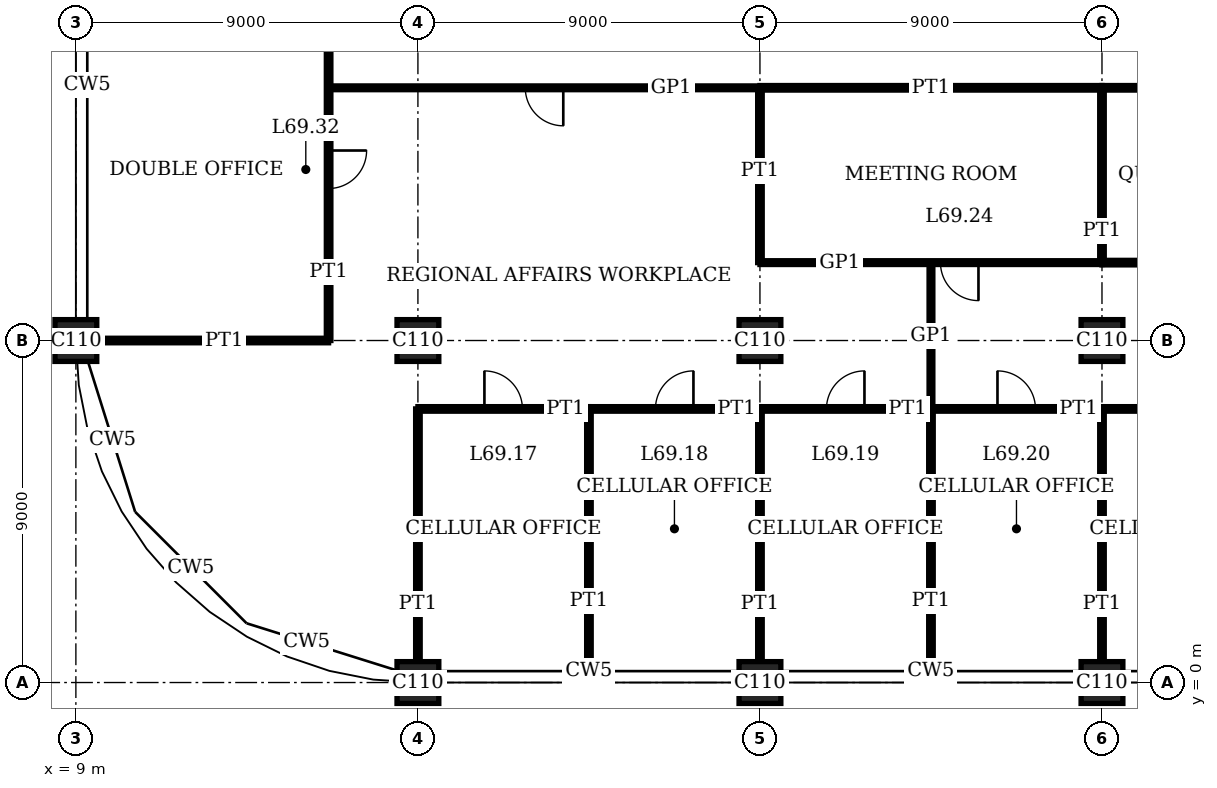
"""IFC4 building model, lengths in metres.
Left out: names, types, materials, properties, quantities, classifications, styles, units other than length and angle.
Written with IfcOpenShell. Run it as: python <this file> out.ifc"""

import sys

from ifc_helpers import new_model, si_unit, direction, frame, frame_2d, origin, origin_2d, place, context, subcontext, project, spatial, rectangle, extrude, element, fill, save


model = new_model("IFC4")
c1 = context("Model", 3, precision=1e-05, world=origin(), true_north=direction((0.0, 1.0)))
c2 = subcontext(c1, "Body", "Model", "MODEL_VIEW")
j1 = project(units=[si_unit("LENGTHUNIT", "METRE"), si_unit("PLANEANGLEUNIT", "RADIAN")], contexts=[c1])
p1 = place(None, origin())
s1 = spatial("IfcSite", under=j1, at=p1, CompositionType="ELEMENT")
p2 = place(p1, origin())
s2 = spatial("IfcBuilding", under=s1, at=p2, CompositionType="ELEMENT")
p3 = place(p2, frame((0.0, 0.0, 283.4)))
s3 = spatial("IfcBuildingStorey", under=s2, at=p3, CompositionType="ELEMENT", Elevation=283.4)
for number, where, z_axis, x_axis in (
    (1, (9.0, 9.0, 0.0), (0.0, 0.0, 1.0), (1.0, 0.0, 0.0)),
    (2, (18.0, 0.0, 0.0), (0.0, 0.0, 1.0), (1.0, 0.0, 0.0)),
    (3, (18.0, 9.0, 0.0), (0.0, 0.0, 1.0), (1.0, 0.0, 0.0)),
    (4, (27.0, 0.0, 0.0), (0.0, 0.0, 1.0), (1.0, 0.0, 0.0)),
    (5, (27.0, 9.0, 0.0), (0.0, 0.0, 1.0), (1.0, 0.0, 0.0)),
    (6, (36.0, 0.0, 0.0), (0.0, 0.0, 1.0), (1.0, 0.0, 0.0)),
    (7, (36.0, 9.0, 0.0), (0.0, 0.0, 1.0), (1.0, 0.0, 0.0)),
):
    element("IfcColumn", number, at=place(p3, frame(where, z_axis=z_axis, x_axis=x_axis)), inside=s3, PredefinedType="COLUMN", context=c2, shape_type="SweptSolid", body=[
        extrude(rectangle(XDim=1.1, YDim=1.1, at=origin_2d()), origin(), (0.0, 0.0, 1.0), 4.0),
    ])
p4 = place(p3, frame((18.0, 7.2, 0.0), z_axis=(0.0, 0.0, 1.0), x_axis=(1.0, 0.0, 0.0)))
e8 = element("IfcWall", 8, at=p4, inside=s3, PredefinedType="PARTITIONING", context=c2, shape_type="SweptSolid", body=[
    extrude(rectangle(XDim=4.5, YDim=0.12, at=frame_2d((2.25, 0.0))), origin(), (0.0, 0.0, 1.0), 3.75),
])
p5 = place(p4, frame((1.75, 0.0, 0.0)))
e9 = element("IfcOpeningElement", 9, at=p5, cuts=e8, PredefinedType="OPENING", context=c2, shape_type="SweptSolid", body=[
    extrude(rectangle(XDim=1.0, YDim=2.4, at=frame_2d((0.5, 1.2))), frame((0.0, 0.07, 0.0), z_axis=(0.0, -1.0, 0.0), x_axis=(1.0, 0.0, 0.0)), (0.0, 0.0, 1.0), 0.14),
])
p6 = place(p3, frame((22.5, 7.2, 0.0), z_axis=(0.0, 0.0, 1.0), x_axis=(1.0, 0.0, 0.0)))
e10 = element("IfcWall", 10, at=p6, inside=s3, PredefinedType="PARTITIONING", context=c2, shape_type="SweptSolid", body=[
    extrude(rectangle(XDim=4.5, YDim=0.12, at=frame_2d((2.25, 0.0))), origin(), (0.0, 0.0, 1.0), 3.75),
])
p7 = place(p6, frame((1.75, 0.0, 0.0)))
e11 = element("IfcOpeningElement", 11, at=p7, cuts=e10, PredefinedType="OPENING", context=c2, shape_type="SweptSolid", body=[
    extrude(rectangle(XDim=1.0, YDim=2.4, at=frame_2d((0.5, 1.2))), frame((0.0, 0.07, 0.0), z_axis=(0.0, -1.0, 0.0), x_axis=(1.0, 0.0, 0.0)), (0.0, 0.0, 1.0), 0.14),
])
p8 = place(p3, frame((27.0, 7.2, 0.0), z_axis=(0.0, 0.0, 1.0), x_axis=(1.0, 0.0, 0.0)))
e12 = element("IfcWall", 12, at=p8, inside=s3, PredefinedType="PARTITIONING", context=c2, shape_type="SweptSolid", body=[
    extrude(rectangle(XDim=4.5, YDim=0.12, at=frame_2d((2.25, 0.0))), origin(), (0.0, 0.0, 1.0), 3.75),
])
p9 = place(p8, frame((1.75, 0.0, 0.0)))
e13 = element("IfcOpeningElement", 13, at=p9, cuts=e12, PredefinedType="OPENING", context=c2, shape_type="SweptSolid", body=[
    extrude(rectangle(XDim=1.0, YDim=2.4, at=frame_2d((0.5, 1.2))), frame((0.0, 0.07, 0.0), z_axis=(0.0, -1.0, 0.0), x_axis=(1.0, 0.0, 0.0)), (0.0, 0.0, 1.0), 0.14),
])
p10 = place(p3, frame((31.5, 7.2, 0.0), z_axis=(0.0, 0.0, 1.0), x_axis=(1.0, 0.0, 0.0)))
e14 = element("IfcWall", 14, at=p10, inside=s3, PredefinedType="PARTITIONING", context=c2, shape_type="SweptSolid", body=[
    extrude(rectangle(XDim=4.5, YDim=0.12, at=frame_2d((2.25, 0.0))), origin(), (0.0, 0.0, 1.0), 3.75),
])
p11 = place(p10, frame((1.75, 0.0, 0.0)))
e15 = element("IfcOpeningElement", 15, at=p11, cuts=e14, PredefinedType="OPENING", context=c2, shape_type="SweptSolid", body=[
    extrude(rectangle(XDim=1.0, YDim=2.4, at=frame_2d((0.5, 1.2))), frame((0.0, 0.07, 0.0), z_axis=(0.0, -1.0, 0.0), x_axis=(1.0, 0.0, 0.0)), (0.0, 0.0, 1.0), 0.14),
])
p12 = place(p3, frame((36.0, 7.2, 0.0), z_axis=(0.0, 0.0, 1.0), x_axis=(1.0, 0.0, 0.0)))
e16 = element("IfcWall", 16, at=p12, inside=s3, PredefinedType="PARTITIONING", context=c2, shape_type="SweptSolid", body=[
    extrude(rectangle(XDim=4.5, YDim=0.12, at=frame_2d((2.25, 0.0))), origin(), (0.0, 0.0, 1.0), 3.75),
])
p13 = place(p12, frame((1.75, 0.0, 0.0)))
e17 = element("IfcOpeningElement", 17, at=p13, cuts=e16, PredefinedType="OPENING", context=c2, shape_type="SweptSolid", body=[
    extrude(rectangle(XDim=1.0, YDim=2.4, at=frame_2d((0.5, 1.2))), frame((0.0, 0.07, 0.0), z_axis=(0.0, -1.0, 0.0), x_axis=(1.0, 0.0, 0.0)), (0.0, 0.0, 1.0), 0.14),
])
p14 = place(p3, frame((9.55, 9.0, 0.0), z_axis=(0.0, 0.0, 1.0), x_axis=(1.0, 0.0, 0.0)))
e18 = element("IfcWall", 18, at=p14, inside=s3, PredefinedType="PARTITIONING", context=c2, shape_type="SweptSolid", body=[
    extrude(rectangle(XDim=6.1, YDim=0.12, at=frame_2d((3.05, 0.0))), origin(), (0.0, 0.0, 1.0), 3.05),
])
p15 = place(p3, frame((36.0, 11.05, 0.0), z_axis=(0.0, 0.0, 1.0), x_axis=(1.0, 0.0, 0.0)))
e19 = element("IfcWall", 19, at=p15, inside=s3, PredefinedType="PARTITIONING", context=c2, shape_type="SweptSolid", body=[
    extrude(rectangle(XDim=4.5, YDim=0.12, at=frame_2d((2.25, 0.0))), origin(), (0.0, 0.0, 1.0), 3.75),
])
p16 = place(p15, frame((1.75, 0.0, 0.0)))
e20 = element("IfcOpeningElement", 20, at=p16, cuts=e19, PredefinedType="OPENING", context=c2, shape_type="SweptSolid", body=[
    extrude(rectangle(XDim=1.0, YDim=2.4, at=frame_2d((0.5, 1.2))), frame((0.0, 0.07, 0.0), z_axis=(0.0, -1.0, 0.0), x_axis=(1.0, 0.0, 0.0)), (0.0, 0.0, 1.0), 0.14),
])
p17 = place(p3, frame((27.0, 11.05, 0.0), z_axis=(0.0, 0.0, 1.0), x_axis=(1.0, 0.0, 0.0)))
e21 = element("IfcWall", 21, at=p17, inside=s3, PredefinedType="PARTITIONING", context=c2, shape_type="SweptSolid", body=[
    extrude(rectangle(XDim=9.0, YDim=0.1, at=frame_2d((4.5, 0.0))), origin(), (0.0, 0.0, 1.0), 3.75),
])
p18 = place(p17, frame((4.75, 0.0, 0.0)))
e22 = element("IfcOpeningElement", 22, at=p18, cuts=e21, PredefinedType="OPENING", context=c2, shape_type="SweptSolid", body=[
    extrude(rectangle(XDim=1.0, YDim=2.4, at=frame_2d((0.5, 1.2))), frame((0.0, 0.06, 0.0), z_axis=(0.0, -1.0, 0.0), x_axis=(1.0, 0.0, 0.0)), (0.0, 0.0, 1.0), 0.12),
])
p19 = place(p3, frame((27.0, 15.65, 0.0), z_axis=(0.0, 0.0, 1.0), x_axis=(1.0, 0.0, 0.0)))
e23 = element("IfcWall", 23, at=p19, inside=s3, PredefinedType="PARTITIONING", context=c2, shape_type="SweptSolid", body=[
    extrude(rectangle(XDim=9.0, YDim=0.12, at=frame_2d((4.5, 0.0))), origin(), (0.0, 0.0, 1.0), 3.75),
])
p20 = place(p3, frame((36.0, 15.65, 0.0), z_axis=(0.0, 0.0, 1.0), x_axis=(1.0, 0.0, 0.0)))
e24 = element("IfcWall", 24, at=p20, inside=s3, PredefinedType="PARTITIONING", context=c2, shape_type="SweptSolid", body=[
    extrude(rectangle(XDim=4.5, YDim=0.12, at=frame_2d((2.25, 0.0))), origin(), (0.0, 0.0, 1.0), 3.75),
])
p21 = place(p3, frame((15.66, 15.65, 0.0), z_axis=(0.0, 0.0, 1.0), x_axis=(1.0, 0.0, 0.0)))
e25 = element("IfcWall", 25, at=p21, inside=s3, PredefinedType="PARTITIONING", context=c2, shape_type="SweptSolid", body=[
    extrude(rectangle(XDim=11.33, YDim=0.1, at=frame_2d((5.665, 0.0))), origin(), (0.0, 0.0, 1.0), 3.75),
])
p22 = place(p21, frame((5.165, 0.0, 0.0)))
e26 = element("IfcOpeningElement", 26, at=p22, cuts=e25, PredefinedType="OPENING", context=c2, shape_type="SweptSolid", body=[
    extrude(rectangle(XDim=1.0, YDim=2.4, at=frame_2d((0.5, 1.2))), frame((0.0, 0.06, 0.0), z_axis=(0.0, -1.0, 0.0), x_axis=(1.0, 0.0, 0.0)), (0.0, 0.0, 1.0), 0.12),
])
p23 = place(p3, frame((15.65, 9.0, 0.0), z_axis=(0.0, 0.0, 1.0), x_axis=(0.0, 1.0, 0.0)))
e27 = element("IfcWall", 27, at=p23, inside=s3, PredefinedType="PARTITIONING", context=c2, shape_type="SweptSolid", body=[
    extrude(rectangle(XDim=9.0, YDim=0.12, at=frame_2d((4.5, 0.0))), origin(), (0.0, 0.0, 1.0), 3.75),
])
p24 = place(p23, frame((4.0, 0.0, 0.0)))
e28 = element("IfcOpeningElement", 28, at=p24, cuts=e27, PredefinedType="OPENING", context=c2, shape_type="SweptSolid", body=[
    extrude(rectangle(XDim=1.0, YDim=2.4, at=frame_2d((0.5, 1.2))), frame((0.0, 0.07, 0.0), z_axis=(0.0, -1.0, 0.0), x_axis=(1.0, 0.0, 0.0)), (0.0, 0.0, 1.0), 0.14),
])
p25 = place(p3, frame((18.0, 0.55, 0.0), z_axis=(0.0, 0.0, 1.0), x_axis=(0.0, 1.0, 0.0)))
e29 = element("IfcWall", 29, at=p25, inside=s3, PredefinedType="PARTITIONING", context=c2, shape_type="SweptSolid", body=[
    extrude(rectangle(XDim=6.65, YDim=0.12, at=frame_2d((3.325, 0.0))), origin(), (0.0, 0.0, 1.0), 3.05),
])
p26 = place(p3, frame((22.5, 0.31, 0.0), z_axis=(0.0, 0.0, 1.0), x_axis=(0.0, 1.0, 0.0)))
e30 = element("IfcWall", 30, at=p26, inside=s3, PredefinedType="PARTITIONING", context=c2, shape_type="SweptSolid", body=[
    extrude(rectangle(XDim=6.89, YDim=0.12, at=frame_2d((3.445, 0.0))), origin(), (0.0, 0.0, 1.0), 3.75),
])
p27 = place(p3, frame((27.0, 0.55, 0.0), z_axis=(0.0, 0.0, 1.0), x_axis=(0.0, 1.0, 0.0)))
e31 = element("IfcWall", 31, at=p27, inside=s3, PredefinedType="PARTITIONING", context=c2, shape_type="SweptSolid", body=[
    extrude(rectangle(XDim=6.65, YDim=0.12, at=frame_2d((3.325, 0.0))), origin(), (0.0, 0.0, 1.0), 3.05),
])
p28 = place(p3, frame((27.0, 11.05, 0.0), z_axis=(0.0, 0.0, 1.0), x_axis=(0.0, 1.0, 0.0)))
e32 = element("IfcWall", 32, at=p28, inside=s3, PredefinedType="PARTITIONING", context=c2, shape_type="SweptSolid", body=[
    extrude(rectangle(XDim=4.6, YDim=0.12, at=frame_2d((2.3, 0.0))), origin(), (0.0, 0.0, 1.0), 3.05),
])
p29 = place(p3, frame((31.5, 0.31, 0.0), z_axis=(0.0, 0.0, 1.0), x_axis=(0.0, 1.0, 0.0)))
e33 = element("IfcWall", 33, at=p29, inside=s3, PredefinedType="PARTITIONING", context=c2, shape_type="SweptSolid", body=[
    extrude(rectangle(XDim=6.89, YDim=0.12, at=frame_2d((3.445, 0.0))), origin(), (0.0, 0.0, 1.0), 3.75),
])
p30 = place(p3, frame((31.5, 7.2, 0.0), z_axis=(0.0, 0.0, 1.0), x_axis=(0.0, 1.0, 0.0)))
e34 = element("IfcWall", 34, at=p30, inside=s3, PredefinedType="PARTITIONING", context=c2, shape_type="SweptSolid", body=[
    extrude(rectangle(XDim=3.86, YDim=0.1, at=frame_2d((1.93, 0.0))), origin(), (0.0, 0.0, 1.0), 3.75),
])
p31 = place(p3, frame((36.0, 0.55, 0.0), z_axis=(0.0, 0.0, 1.0), x_axis=(0.0, 1.0, 0.0)))
e35 = element("IfcWall", 35, at=p31, inside=s3, PredefinedType="PARTITIONING", context=c2, shape_type="SweptSolid", body=[
    extrude(rectangle(XDim=6.65, YDim=0.12, at=frame_2d((3.325, 0.0))), origin(), (0.0, 0.0, 1.0), 3.05),
])
p32 = place(p3, frame((36.0, 11.05, 0.0), z_axis=(0.0, 0.0, 1.0), x_axis=(0.0, 1.0, 0.0)))
e36 = element("IfcWall", 36, at=p32, inside=s3, PredefinedType="PARTITIONING", context=c2, shape_type="SweptSolid", body=[
    extrude(rectangle(XDim=4.6, YDim=0.12, at=frame_2d((2.3, 0.0))), origin(), (0.0, 0.0, 1.0), 3.05),
])
p33 = place(p5, origin())
e37 = element("IfcDoor", 37, at=p33, inside=s3, OperationType="SINGLE_SWING_RIGHT", PredefinedType="DOOR", context=c2, shape_type="SweptSolid", body=[
    extrude(rectangle(XDim=1.0, YDim=2.4, at=frame_2d((0.5, 1.2))), frame((0.0, 0.025, 0.0), z_axis=(0.0, -1.0, 0.0), x_axis=(1.0, 0.0, 0.0)), (0.0, 0.0, 1.0), 0.05),
])
fill(e9, e37)
p34 = place(p7, origin())
e38 = element("IfcDoor", 38, at=p34, inside=s3, OperationType="SINGLE_SWING_LEFT", PredefinedType="DOOR", context=c2, shape_type="SweptSolid", body=[
    extrude(rectangle(XDim=1.0, YDim=2.4, at=frame_2d((0.5, 1.2))), frame((0.0, 0.025, 0.0), z_axis=(0.0, -1.0, 0.0), x_axis=(1.0, 0.0, 0.0)), (0.0, 0.0, 1.0), 0.05),
])
fill(e11, e38)
p35 = place(p9, origin())
e39 = element("IfcDoor", 39, at=p35, inside=s3, OperationType="SINGLE_SWING_LEFT", PredefinedType="DOOR", context=c2, shape_type="SweptSolid", body=[
    extrude(rectangle(XDim=1.0, YDim=2.4, at=frame_2d((0.5, 1.2))), frame((0.0, 0.025, 0.0), z_axis=(0.0, -1.0, 0.0), x_axis=(1.0, 0.0, 0.0)), (0.0, 0.0, 1.0), 0.05),
])
fill(e13, e39)
p36 = place(p11, origin())
e40 = element("IfcDoor", 40, at=p36, inside=s3, OperationType="SINGLE_SWING_RIGHT", PredefinedType="DOOR", context=c2, shape_type="SweptSolid", body=[
    extrude(rectangle(XDim=1.0, YDim=2.4, at=frame_2d((0.5, 1.2))), frame((0.0, 0.025, 0.0), z_axis=(0.0, -1.0, 0.0), x_axis=(1.0, 0.0, 0.0)), (0.0, 0.0, 1.0), 0.05),
])
fill(e15, e40)
p37 = place(p18, origin())
e41 = element("IfcDoor", 41, at=p37, inside=s3, OperationType="SINGLE_SWING_RIGHT", PredefinedType="DOOR", context=c2, shape_type="SweptSolid", body=[
    extrude(rectangle(XDim=1.0, YDim=2.4, at=frame_2d((0.5, 1.2))), frame((0.0, 0.02, 0.0), z_axis=(0.0, -1.0, 0.0), x_axis=(1.0, 0.0, 0.0)), (0.0, 0.0, 1.0), 0.04),
])
fill(e22, e41)
p38 = place(p22, origin())
e42 = element("IfcDoor", 42, at=p38, inside=s3, OperationType="SINGLE_SWING_RIGHT", PredefinedType="DOOR", context=c2, shape_type="SweptSolid", body=[
    extrude(rectangle(XDim=1.0, YDim=2.4, at=frame_2d((0.5, 1.2))), frame((0.0, 0.02, 0.0), z_axis=(0.0, -1.0, 0.0), x_axis=(1.0, 0.0, 0.0)), (0.0, 0.0, 1.0), 0.04),
])
fill(e26, e42)
p39 = place(p24, origin())
e43 = element("IfcDoor", 43, at=p39, inside=s3, OperationType="SINGLE_SWING_RIGHT", PredefinedType="DOOR", context=c2, shape_type="SweptSolid", body=[
    extrude(rectangle(XDim=1.0, YDim=2.4, at=frame_2d((0.5, 1.2))), frame((0.0, 0.025, 0.0), z_axis=(0.0, -1.0, 0.0), x_axis=(1.0, 0.0, 0.0)), (0.0, 0.0, 1.0), 0.05),
])
fill(e28, e43)
save(model, sys.argv[1])
